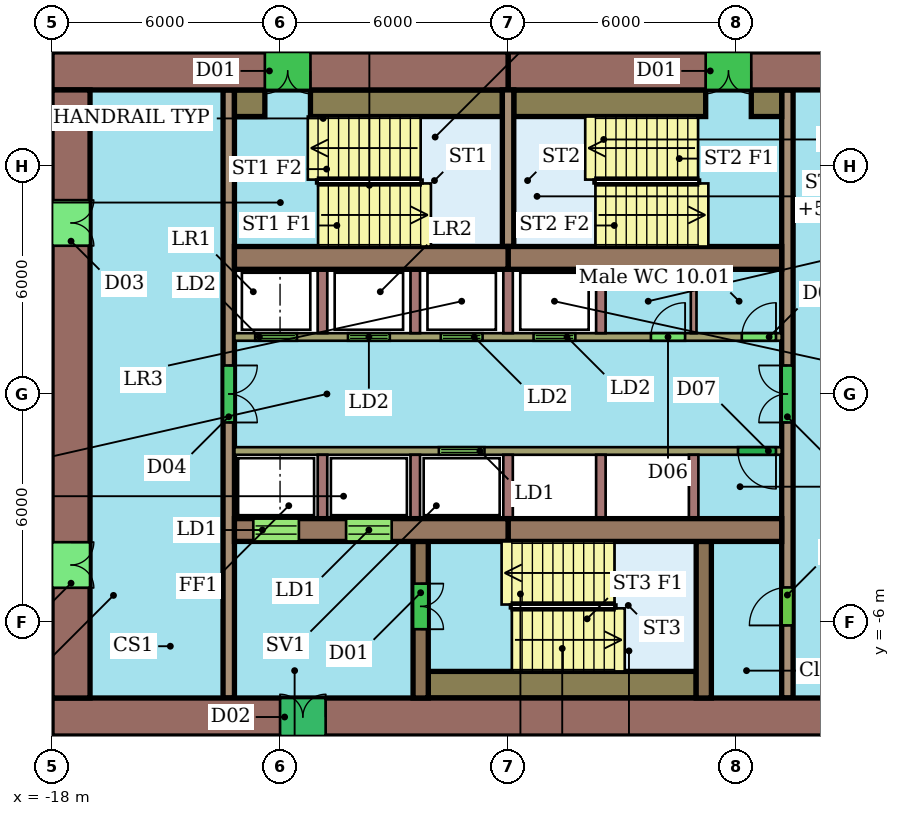
"""IFC4 building model, lengths in metres.
Left out: names, types, materials, properties, quantities, classifications, styles, units other than length and angle.
Written with IfcOpenShell. Run it as: python <this file> out.ifc"""

import sys

from ifc_helpers import new_model, si_unit, direction, frame, frame_2d, origin, place, context, subcontext, project, spatial, rectangle, extrude, element, fill, save


model = new_model("IFC4")
c1 = context("Model", 3, precision=1e-05, world=origin(), true_north=direction((0.0, 1.0)))
c2 = subcontext(c1, "Body", "Model", "MODEL_VIEW")
j1 = project(units=[si_unit("LENGTHUNIT", "METRE"), si_unit("PLANEANGLEUNIT", "RADIAN")], contexts=[c1])
p1 = place(None, origin())
s1 = spatial("IfcSite", under=j1, at=p1, CompositionType="ELEMENT")
p2 = place(p1, origin())
s2 = spatial("IfcBuilding", under=s1, at=p2, CompositionType="ELEMENT")
p3 = place(p2, frame((0.0, 0.0, 54.5)))
s3 = spatial("IfcBuildingStorey", under=s2, at=p3, CompositionType="ELEMENT", Elevation=54.5)
p4 = place(p3, frame((6.0, 8.5, 0.0), z_axis=(0.0, 0.0, 1.0), x_axis=(-1.0, 0.0, 0.0)))
e1 = element("IfcWall", 1, at=p4, inside=s3, PredefinedType="SHEAR", context=c2, shape_type="SweptSolid", body=[
    extrude(rectangle(XDim=12.0, YDim=1.0, at=frame_2d((6.0, 0.0))), origin(), (0.0, 0.0, 1.0), 3.4),
])
p5 = place(p4, frame((5.6, 0.0, 0.0)))
e2 = element("IfcOpeningElement", 2, at=p5, cuts=e1, PredefinedType="OPENING", context=c2, shape_type="SweptSolid", body=[
    extrude(rectangle(XDim=1.2, YDim=2.1, at=frame_2d((0.6, 1.05))), frame((0.0, 0.51, 0.0), z_axis=(0.0, -1.0, 0.0), x_axis=(1.0, 0.0, 0.0)), (0.0, 0.0, 1.0), 1.02),
])
p6 = place(p3, frame((-6.0, 8.5, 0.0), z_axis=(0.0, 0.0, 1.0), x_axis=(-1.0, 0.0, 0.0)))
e3 = element("IfcWall", 3, at=p6, inside=s3, PredefinedType="SHEAR", context=c2, shape_type="SweptSolid", body=[
    extrude(rectangle(XDim=12.0, YDim=1.0, at=frame_2d((6.0, 0.0))), origin(), (0.0, 0.0, 1.0), 3.4),
])
p7 = place(p6, frame((5.2, 0.0, 0.0)))
e4 = element("IfcOpeningElement", 4, at=p7, cuts=e3, PredefinedType="OPENING", context=c2, shape_type="SweptSolid", body=[
    extrude(rectangle(XDim=1.2, YDim=2.1, at=frame_2d((0.6, 1.05))), frame((0.0, 0.51, 0.0), z_axis=(0.0, -1.0, 0.0), x_axis=(1.0, 0.0, 0.0)), (0.0, 0.0, 1.0), 1.02),
])
p8 = place(p3, frame((-18.0, -8.5, 0.0), z_axis=(0.0, 0.0, 1.0), x_axis=(1.0, 0.0, 0.0)))
e5 = element("IfcWall", 5, at=p8, inside=s3, PredefinedType="SHEAR", context=c2, shape_type="SweptSolid", body=[
    extrude(rectangle(XDim=24.0, YDim=1.0, at=frame_2d((12.0, 0.0))), origin(), (0.0, 0.0, 1.0), 3.4),
])
p9 = place(p8, frame((6.0, 0.0, 0.0)))
e6 = element("IfcOpeningElement", 6, at=p9, cuts=e5, PredefinedType="OPENING", context=c2, shape_type="SweptSolid", body=[
    extrude(rectangle(XDim=1.2, YDim=2.1, at=frame_2d((0.6, 1.05))), frame((0.0, 0.51, 0.0), z_axis=(0.0, -1.0, 0.0), x_axis=(1.0, 0.0, 0.0)), (0.0, 0.0, 1.0), 1.02),
])
p10 = place(p3, frame((-17.5, 8.0, 0.0), z_axis=(0.0, 0.0, 1.0), x_axis=(0.0, -1.0, 0.0)))
e7 = element("IfcWall", 7, at=p10, inside=s3, PredefinedType="SHEAR", context=c2, shape_type="SweptSolid", body=[
    extrude(rectangle(XDim=16.0, YDim=1.0, at=frame_2d((8.0, 0.0))), origin(), (0.0, 0.0, 1.0), 3.4),
])
p11 = place(p10, frame((11.9, 0.0, 0.0)))
e8 = element("IfcOpeningElement", 8, at=p11, cuts=e7, PredefinedType="OPENING", context=c2, shape_type="SweptSolid", body=[
    extrude(rectangle(XDim=1.2, YDim=2.1, at=frame_2d((0.6, 1.05))), frame((0.0, 0.51, 0.0), z_axis=(0.0, -1.0, 0.0), x_axis=(1.0, 0.0, 0.0)), (0.0, 0.0, 1.0), 1.02),
])
p12 = place(p10, frame((2.9, 0.0, 0.0)))
e9 = element("IfcOpeningElement", 9, at=p12, cuts=e7, PredefinedType="OPENING", context=c2, shape_type="SweptSolid", body=[
    extrude(rectangle(XDim=1.2, YDim=2.1, at=frame_2d((0.6, 1.05))), frame((0.0, 0.51, 0.0), z_axis=(0.0, -1.0, 0.0), x_axis=(1.0, 0.0, 0.0)), (0.0, 0.0, 1.0), 1.02),
])
for number, where, z_axis, x_axis in (
    (10, (-13.2, 3.58, 0.0), (0.0, 0.0, 1.0), (1.0, 0.0, 0.0)),
    (11, (-6.0, 3.58, 0.0), (0.0, 0.0, 1.0), (1.0, 0.0, 0.0)),
):
    element("IfcWall", number, at=place(p3, frame(where, z_axis=z_axis, x_axis=x_axis)), inside=s3, PredefinedType="SHEAR", context=c2, shape_type="SweptSolid", body=[
        extrude(rectangle(XDim=7.2, YDim=0.6, at=frame_2d((3.6, 0.0))), origin(), (0.0, 0.0, 1.0), 3.4),
    ])
p13 = place(p3, frame((-13.2, -3.58, 0.0), z_axis=(0.0, 0.0, 1.0), x_axis=(1.0, 0.0, 0.0)))
e12 = element("IfcWall", 12, at=p13, inside=s3, PredefinedType="SHEAR", context=c2, shape_type="SweptSolid", body=[
    extrude(rectangle(XDim=7.2, YDim=0.6, at=frame_2d((3.6, 0.0))), origin(), (0.0, 0.0, 1.0), 3.4),
])
p14 = place(p13, frame((0.496, 0.0, 0.0)))
e13 = element("IfcOpeningElement", 13, at=p14, cuts=e12, PredefinedType="OPENING", context=c2, shape_type="SweptSolid", body=[
    extrude(rectangle(XDim=1.2, YDim=2.1, at=frame_2d((0.6, 1.05))), frame((0.0, 0.31, 0.0), z_axis=(0.0, -1.0, 0.0), x_axis=(1.0, 0.0, 0.0)), (0.0, 0.0, 1.0), 0.62),
])
p15 = place(p13, frame((2.938, 0.0, 0.0)))
e14 = element("IfcOpeningElement", 14, at=p15, cuts=e12, PredefinedType="OPENING", context=c2, shape_type="SweptSolid", body=[
    extrude(rectangle(XDim=1.2, YDim=2.1, at=frame_2d((0.6, 1.05))), frame((0.0, 0.31, 0.0), z_axis=(0.0, -1.0, 0.0), x_axis=(1.0, 0.0, 0.0)), (0.0, 0.0, 1.0), 0.62),
])
p16 = place(p3, frame((-6.0, -3.58, 0.0), z_axis=(0.0, 0.0, 1.0), x_axis=(1.0, 0.0, 0.0)))
e15 = element("IfcWall", 15, at=p16, inside=s3, PredefinedType="SHEAR", context=c2, shape_type="SweptSolid", body=[
    extrude(rectangle(XDim=7.2, YDim=0.6, at=frame_2d((3.6, 0.0))), origin(), (0.0, 0.0, 1.0), 3.4),
])
p17 = place(p3, frame((-13.35, 8.0, 0.0), z_axis=(0.0, 0.0, 1.0), x_axis=(0.0, -1.0, 0.0)))
e16 = element("IfcWall", 16, at=p17, inside=s3, PredefinedType="SHEAR", context=c2, shape_type="SweptSolid", body=[
    extrude(rectangle(XDim=16.0, YDim=0.3, at=frame_2d((8.0, 0.0))), origin(), (0.0, 0.0, 1.0), 3.4),
])
p18 = place(p17, frame((7.25, 0.0, 0.0)))
e17 = element("IfcOpeningElement", 17, at=p18, cuts=e16, PredefinedType="OPENING", context=c2, shape_type="SweptSolid", body=[
    extrude(rectangle(XDim=1.5, YDim=2.1, at=frame_2d((0.75, 1.05))), frame((0.0, 0.16, 0.0), z_axis=(0.0, -1.0, 0.0), x_axis=(1.0, 0.0, 0.0)), (0.0, 0.0, 1.0), 0.32),
])
p19 = place(p3, frame((1.35, -8.0, 0.0), z_axis=(0.0, 0.0, 1.0), x_axis=(0.0, 1.0, 0.0)))
e18 = element("IfcWall", 18, at=p19, inside=s3, PredefinedType="SHEAR", context=c2, shape_type="SweptSolid", body=[
    extrude(rectangle(XDim=16.0, YDim=0.3, at=frame_2d((8.0, 0.0))), origin(), (0.0, 0.0, 1.0), 3.4),
])
p20 = place(p19, frame((1.91, 0.0, 0.0)))
e19 = element("IfcOpeningElement", 19, at=p20, cuts=e18, PredefinedType="OPENING", context=c2, shape_type="SweptSolid", body=[
    extrude(rectangle(XDim=1.0, YDim=2.1, at=frame_2d((0.5, 1.05))), frame((0.0, 0.16, 0.0), z_axis=(0.0, -1.0, 0.0), x_axis=(1.0, 0.0, 0.0)), (0.0, 0.0, 1.0), 0.32),
])
p21 = place(p19, frame((7.25, 0.0, 0.0)))
e20 = element("IfcOpeningElement", 20, at=p21, cuts=e18, PredefinedType="OPENING", context=c2, shape_type="SweptSolid", body=[
    extrude(rectangle(XDim=1.5, YDim=2.1, at=frame_2d((0.75, 1.05))), frame((0.0, 0.16, 0.0), z_axis=(0.0, -1.0, 0.0), x_axis=(1.0, 0.0, 0.0)), (0.0, 0.0, 1.0), 0.32),
])
p22 = place(p3, frame((-13.2, 1.5, 0.0), z_axis=(0.0, 0.0, 1.0), x_axis=(1.0, 0.0, 0.0)))
e21 = element("IfcWall", 21, at=p22, inside=s3, PredefinedType="SHEAR", context=c2, shape_type="SweptSolid", body=[
    extrude(rectangle(XDim=14.4, YDim=0.2, at=frame_2d((7.2, 0.0))), origin(), (0.0, 0.0, 1.0), 3.4),
])
p23 = place(p22, frame((0.546, 0.0, 0.0)))
e22 = element("IfcOpeningElement", 22, at=p23, cuts=e21, PredefinedType="OPENING", context=c2, shape_type="SweptSolid", body=[
    extrude(rectangle(XDim=1.1, YDim=2.1, at=frame_2d((0.55, 1.05))), frame((0.0, 0.11, 0.0), z_axis=(0.0, -1.0, 0.0), x_axis=(1.0, 0.0, 0.0)), (0.0, 0.0, 1.0), 0.22),
])
p24 = place(p22, frame((2.988, 0.0, 0.0)))
e23 = element("IfcOpeningElement", 23, at=p24, cuts=e21, PredefinedType="OPENING", context=c2, shape_type="SweptSolid", body=[
    extrude(rectangle(XDim=1.1, YDim=2.1, at=frame_2d((0.55, 1.05))), frame((0.0, 0.11, 0.0), z_axis=(0.0, -1.0, 0.0), x_axis=(1.0, 0.0, 0.0)), (0.0, 0.0, 1.0), 0.22),
])
p25 = place(p22, frame((5.429, 0.0, 0.0)))
e24 = element("IfcOpeningElement", 24, at=p25, cuts=e21, PredefinedType="OPENING", context=c2, shape_type="SweptSolid", body=[
    extrude(rectangle(XDim=1.1, YDim=2.1, at=frame_2d((0.55, 1.05))), frame((0.0, 0.11, 0.0), z_axis=(0.0, -1.0, 0.0), x_axis=(1.0, 0.0, 0.0)), (0.0, 0.0, 1.0), 0.22),
])
p26 = place(p22, frame((7.871, 0.0, 0.0)))
e25 = element("IfcOpeningElement", 25, at=p26, cuts=e21, PredefinedType="OPENING", context=c2, shape_type="SweptSolid", body=[
    extrude(rectangle(XDim=1.1, YDim=2.1, at=frame_2d((0.55, 1.05))), frame((0.0, 0.11, 0.0), z_axis=(0.0, -1.0, 0.0), x_axis=(1.0, 0.0, 0.0)), (0.0, 0.0, 1.0), 0.22),
])
p27 = place(p22, frame((10.958, 0.0, 0.0)))
e26 = element("IfcOpeningElement", 26, at=p27, cuts=e21, PredefinedType="OPENING", context=c2, shape_type="SweptSolid", body=[
    extrude(rectangle(XDim=0.9, YDim=2.1, at=frame_2d((0.45, 1.05))), frame((0.0, 0.11, 0.0), z_axis=(0.0, -1.0, 0.0), x_axis=(1.0, 0.0, 0.0)), (0.0, 0.0, 1.0), 0.22),
])
p28 = place(p22, frame((13.35, 0.0, 0.0)))
e27 = element("IfcOpeningElement", 27, at=p28, cuts=e21, PredefinedType="OPENING", context=c2, shape_type="SweptSolid", body=[
    extrude(rectangle(XDim=0.9, YDim=2.1, at=frame_2d((0.45, 1.05))), frame((0.0, 0.11, 0.0), z_axis=(0.0, -1.0, 0.0), x_axis=(1.0, 0.0, 0.0)), (0.0, 0.0, 1.0), 0.22),
])
p29 = place(p3, frame((1.2, -1.5, 0.0), z_axis=(0.0, 0.0, 1.0), x_axis=(-1.0, 0.0, 0.0)))
e28 = element("IfcWall", 28, at=p29, inside=s3, PredefinedType="SHEAR", context=c2, shape_type="SweptSolid", body=[
    extrude(rectangle(XDim=14.4, YDim=0.2, at=frame_2d((7.2, 0.0))), origin(), (0.0, 0.0, 1.0), 3.4),
])
p30 = place(p29, frame((7.821, 0.0, 0.0)))
e29 = element("IfcOpeningElement", 29, at=p30, cuts=e28, PredefinedType="OPENING", context=c2, shape_type="SweptSolid", body=[
    extrude(rectangle(XDim=1.2, YDim=2.1, at=frame_2d((0.6, 1.05))), frame((0.0, 0.11, 0.0), z_axis=(0.0, -1.0, 0.0), x_axis=(1.0, 0.0, 0.0)), (0.0, 0.0, 1.0), 0.22),
])
p31 = place(p29, frame((0.15, 0.0, 0.0)))
e30 = element("IfcOpeningElement", 30, at=p31, cuts=e28, PredefinedType="OPENING", context=c2, shape_type="SweptSolid", body=[
    extrude(rectangle(XDim=1.0, YDim=2.1, at=frame_2d((0.5, 1.05))), frame((0.0, 0.11, 0.0), z_axis=(0.0, -1.0, 0.0), x_axis=(1.0, 0.0, 0.0)), (0.0, 0.0, 1.0), 0.22),
])
p32 = place(p3, frame((-8.3, -3.88, 0.0), z_axis=(0.0, 0.0, 1.0), x_axis=(0.0, -1.0, 0.0)))
e31 = element("IfcWall", 31, at=p32, inside=s3, PredefinedType="SHEAR", context=c2, shape_type="SweptSolid", body=[
    extrude(rectangle(XDim=4.12, YDim=0.4, at=frame_2d((2.06, 0.0))), origin(), (0.0, 0.0, 1.0), 3.4),
])
p33 = place(p32, frame((1.11, 0.0, 0.0)))
e32 = element("IfcOpeningElement", 32, at=p33, cuts=e31, PredefinedType="OPENING", context=c2, shape_type="SweptSolid", body=[
    extrude(rectangle(XDim=1.2, YDim=2.1, at=frame_2d((0.6, 1.05))), frame((0.0, 0.21, 0.0), z_axis=(0.0, -1.0, 0.0), x_axis=(1.0, 0.0, 0.0)), (0.0, 0.0, 1.0), 0.42),
])
p34 = place(p3, frame((-0.85, -3.88, 0.0), z_axis=(0.0, 0.0, 1.0), x_axis=(0.0, -1.0, 0.0)))
e33 = element("IfcWall", 33, at=p34, inside=s3, PredefinedType="SHEAR", context=c2, shape_type="SweptSolid", body=[
    extrude(rectangle(XDim=4.12, YDim=0.4, at=frame_2d((2.06, 0.0))), origin(), (0.0, 0.0, 1.0), 3.4),
])
p35 = place(p3, frame((-6.0, 3.88, 0.0), z_axis=(0.0, 0.0, 1.0), x_axis=(0.0, 1.0, 0.0)))
e34 = element("IfcWall", 34, at=p35, inside=s3, PredefinedType="SHEAR", context=c2, shape_type="SweptSolid", body=[
    extrude(rectangle(XDim=4.12, YDim=0.3, at=frame_2d((2.06, 0.0))), origin(), (0.0, 0.0, 1.0), 3.4),
])
p36 = place(p3, frame((-13.2, 7.65, 0.0), z_axis=(0.0, 0.0, 1.0), x_axis=(1.0, 0.0, 0.0)))
e35 = element("IfcWall", 35, at=p36, inside=s3, PredefinedType="SHEAR", context=c2, shape_type="SweptSolid", body=[
    extrude(rectangle(XDim=0.8, YDim=0.7, at=frame_2d((0.4, 0.0))), origin(), (0.0, 0.0, 1.0), 3.4),
])
for number, where, z_axis, x_axis in (
    (36, (-11.2, 7.65, 0.0), (0.0, 0.0, 1.0), (1.0, 0.0, 0.0)),
    (37, (-5.85, 7.65, 0.0), (0.0, 0.0, 1.0), (1.0, 0.0, 0.0)),
):
    element("IfcWall", number, at=place(p3, frame(where, z_axis=z_axis, x_axis=x_axis)), inside=s3, PredefinedType="SHEAR", context=c2, shape_type="SweptSolid", body=[
        extrude(rectangle(XDim=5.05, YDim=0.7, at=frame_2d((2.525, 0.0))), origin(), (0.0, 0.0, 1.0), 3.4),
    ])
p37 = place(p3, frame((0.4, 7.65, 0.0), z_axis=(0.0, 0.0, 1.0), x_axis=(1.0, 0.0, 0.0)))
e38 = element("IfcWall", 38, at=p37, inside=s3, PredefinedType="SHEAR", context=c2, shape_type="SweptSolid", body=[
    extrude(rectangle(XDim=0.8, YDim=0.7, at=frame_2d((0.4, 0.0))), origin(), (0.0, 0.0, 1.0), 3.4),
])
p38 = place(p3, frame((-8.1, -7.65, 0.0), z_axis=(0.0, 0.0, 1.0), x_axis=(1.0, 0.0, 0.0)))
e39 = element("IfcWall", 39, at=p38, inside=s3, PredefinedType="SHEAR", context=c2, shape_type="SweptSolid", body=[
    extrude(rectangle(XDim=7.05, YDim=0.7, at=frame_2d((3.525, 0.0))), origin(), (0.0, 0.0, 1.0), 3.4),
])
for number, where, z_axis, x_axis in (
    (40, (-10.883, 1.6, 0.0), (0.0, 0.0, 1.0), (0.0, 1.0, 0.0)),
    (41, (-8.442, 1.6, 0.0), (0.0, 0.0, 1.0), (0.0, 1.0, 0.0)),
    (42, (-6.0, 1.6, 0.0), (0.0, 0.0, 1.0), (0.0, 1.0, 0.0)),
    (43, (-3.558, 1.6, 0.0), (0.0, 0.0, 1.0), (0.0, 1.0, 0.0)),
):
    element("IfcWall", number, at=place(p3, frame(where, z_axis=z_axis, x_axis=x_axis)), inside=s3, PredefinedType="SHEAR", context=c2, shape_type="SweptSolid", body=[
        extrude(rectangle(XDim=1.68, YDim=0.25, at=frame_2d((0.84, 0.0))), origin(), (0.0, 0.0, 1.0), 3.4),
    ])
p39 = place(p3, frame((-1.117, 1.6, 0.0), z_axis=(0.0, 0.0, 1.0), x_axis=(0.0, 1.0, 0.0)))
e44 = element("IfcWall", 44, at=p39, inside=s3, PredefinedType="PARTITIONING", context=c2, shape_type="SweptSolid", body=[
    extrude(rectangle(XDim=1.68, YDim=0.15, at=frame_2d((0.84, 0.0))), origin(), (0.0, 0.0, 1.0), 3.4),
])
for number, where, z_axis, x_axis in (
    (45, (-10.883, -1.6, 0.0), (0.0, 0.0, 1.0), (0.0, -1.0, 0.0)),
    (46, (-8.442, -1.6, 0.0), (0.0, 0.0, 1.0), (0.0, -1.0, 0.0)),
    (47, (-6.0, -1.6, 0.0), (0.0, 0.0, 1.0), (0.0, -1.0, 0.0)),
    (48, (-3.558, -1.6, 0.0), (0.0, 0.0, 1.0), (0.0, -1.0, 0.0)),
    (49, (-1.117, -1.6, 0.0), (0.0, 0.0, 1.0), (0.0, -1.0, 0.0)),
):
    element("IfcWall", number, at=place(p3, frame(where, z_axis=z_axis, x_axis=x_axis)), inside=s3, PredefinedType="SHEAR", context=c2, shape_type="SweptSolid", body=[
        extrude(rectangle(XDim=1.68, YDim=0.25, at=frame_2d((0.84, 0.0))), origin(), (0.0, 0.0, 1.0), 3.4),
    ])
p40 = place(p5, origin())
e50 = element("IfcDoor", 50, at=p40, inside=s3, OperationType="DOUBLE_DOOR_SINGLE_SWING", PredefinedType="NOTDEFINED", context=c2, shape_type="SweptSolid", body=[
    extrude(rectangle(XDim=1.2, YDim=2.1, at=frame_2d((0.6, 1.05))), frame((0.0, 0.025, 0.0), z_axis=(0.0, -1.0, 0.0), x_axis=(1.0, 0.0, 0.0)), (0.0, 0.0, 1.0), 0.05),
])
fill(e2, e50)
p41 = place(p7, origin())
e51 = element("IfcDoor", 51, at=p41, inside=s3, OperationType="DOUBLE_DOOR_SINGLE_SWING", PredefinedType="NOTDEFINED", context=c2, shape_type="SweptSolid", body=[
    extrude(rectangle(XDim=1.2, YDim=2.1, at=frame_2d((0.6, 1.05))), frame((0.0, 0.025, 0.0), z_axis=(0.0, -1.0, 0.0), x_axis=(1.0, 0.0, 0.0)), (0.0, 0.0, 1.0), 0.05),
])
fill(e4, e51)
p42 = place(p9, origin())
e52 = element("IfcDoor", 52, at=p42, inside=s3, OperationType="DOUBLE_DOOR_SINGLE_SWING", PredefinedType="NOTDEFINED", context=c2, shape_type="SweptSolid", body=[
    extrude(rectangle(XDim=1.2, YDim=2.1, at=frame_2d((0.6, 1.05))), frame((0.0, 0.025, 0.0), z_axis=(0.0, -1.0, 0.0), x_axis=(1.0, 0.0, 0.0)), (0.0, 0.0, 1.0), 0.05),
])
fill(e6, e52)
p43 = place(p11, origin())
e53 = element("IfcDoor", 53, at=p43, inside=s3, OperationType="DOUBLE_DOOR_SINGLE_SWING", PredefinedType="NOTDEFINED", context=c2, shape_type="SweptSolid", body=[
    extrude(rectangle(XDim=1.2, YDim=2.1, at=frame_2d((0.6, 1.05))), frame((0.0, 0.025, 0.0), z_axis=(0.0, -1.0, 0.0), x_axis=(1.0, 0.0, 0.0)), (0.0, 0.0, 1.0), 0.05),
])
fill(e8, e53)
p44 = place(p12, origin())
e54 = element("IfcDoor", 54, at=p44, inside=s3, OperationType="DOUBLE_DOOR_SINGLE_SWING", PredefinedType="NOTDEFINED", context=c2, shape_type="SweptSolid", body=[
    extrude(rectangle(XDim=1.2, YDim=2.1, at=frame_2d((0.6, 1.05))), frame((0.0, 0.025, 0.0), z_axis=(0.0, -1.0, 0.0), x_axis=(1.0, 0.0, 0.0)), (0.0, 0.0, 1.0), 0.05),
])
fill(e9, e54)
p45 = place(p14, origin())
e55 = element("IfcDoor", 55, at=p45, inside=s3, OperationType="DOUBLE_DOOR_SLIDING", PredefinedType="NOTDEFINED", context=c2, shape_type="SweptSolid", body=[
    extrude(rectangle(XDim=1.2, YDim=2.1, at=frame_2d((0.6, 1.05))), frame((0.0, 0.025, 0.0), z_axis=(0.0, -1.0, 0.0), x_axis=(1.0, 0.0, 0.0)), (0.0, 0.0, 1.0), 0.05),
])
fill(e13, e55)
p46 = place(p15, origin())
e56 = element("IfcDoor", 56, at=p46, inside=s3, OperationType="DOUBLE_DOOR_SLIDING", PredefinedType="NOTDEFINED", context=c2, shape_type="SweptSolid", body=[
    extrude(rectangle(XDim=1.2, YDim=2.1, at=frame_2d((0.6, 1.05))), frame((0.0, 0.025, 0.0), z_axis=(0.0, -1.0, 0.0), x_axis=(1.0, 0.0, 0.0)), (0.0, 0.0, 1.0), 0.05),
])
fill(e14, e56)
p47 = place(p18, origin())
e57 = element("IfcDoor", 57, at=p47, inside=s3, OperationType="DOUBLE_DOOR_SINGLE_SWING", PredefinedType="NOTDEFINED", context=c2, shape_type="SweptSolid", body=[
    extrude(rectangle(XDim=1.5, YDim=2.1, at=frame_2d((0.75, 1.05))), frame((0.0, 0.025, 0.0), z_axis=(0.0, -1.0, 0.0), x_axis=(1.0, 0.0, 0.0)), (0.0, 0.0, 1.0), 0.05),
])
fill(e17, e57)
p48 = place(p20, origin())
e58 = element("IfcDoor", 58, at=p48, inside=s3, OperationType="SINGLE_SWING_LEFT", PredefinedType="NOTDEFINED", context=c2, shape_type="SweptSolid", body=[
    extrude(rectangle(XDim=1.0, YDim=2.1, at=frame_2d((0.5, 1.05))), frame((0.0, 0.025, 0.0), z_axis=(0.0, -1.0, 0.0), x_axis=(1.0, 0.0, 0.0)), (0.0, 0.0, 1.0), 0.05),
])
fill(e19, e58)
p49 = place(p21, origin())
e59 = element("IfcDoor", 59, at=p49, inside=s3, OperationType="DOUBLE_DOOR_SINGLE_SWING", PredefinedType="NOTDEFINED", context=c2, shape_type="SweptSolid", body=[
    extrude(rectangle(XDim=1.5, YDim=2.1, at=frame_2d((0.75, 1.05))), frame((0.0, 0.025, 0.0), z_axis=(0.0, -1.0, 0.0), x_axis=(1.0, 0.0, 0.0)), (0.0, 0.0, 1.0), 0.05),
])
fill(e20, e59)
p50 = place(p23, origin())
e60 = element("IfcDoor", 60, at=p50, inside=s3, OperationType="DOUBLE_DOOR_SLIDING", PredefinedType="NOTDEFINED", context=c2, shape_type="SweptSolid", body=[
    extrude(rectangle(XDim=1.1, YDim=2.1, at=frame_2d((0.55, 1.05))), frame((0.0, 0.025, 0.0), z_axis=(0.0, -1.0, 0.0), x_axis=(1.0, 0.0, 0.0)), (0.0, 0.0, 1.0), 0.05),
])
fill(e22, e60)
p51 = place(p24, origin())
e61 = element("IfcDoor", 61, at=p51, inside=s3, OperationType="DOUBLE_DOOR_SLIDING", PredefinedType="NOTDEFINED", context=c2, shape_type="SweptSolid", body=[
    extrude(rectangle(XDim=1.1, YDim=2.1, at=frame_2d((0.55, 1.05))), frame((0.0, 0.025, 0.0), z_axis=(0.0, -1.0, 0.0), x_axis=(1.0, 0.0, 0.0)), (0.0, 0.0, 1.0), 0.05),
])
fill(e23, e61)
p52 = place(p25, origin())
e62 = element("IfcDoor", 62, at=p52, inside=s3, OperationType="DOUBLE_DOOR_SLIDING", PredefinedType="NOTDEFINED", context=c2, shape_type="SweptSolid", body=[
    extrude(rectangle(XDim=1.1, YDim=2.1, at=frame_2d((0.55, 1.05))), frame((0.0, 0.025, 0.0), z_axis=(0.0, -1.0, 0.0), x_axis=(1.0, 0.0, 0.0)), (0.0, 0.0, 1.0), 0.05),
])
fill(e24, e62)
p53 = place(p26, origin())
e63 = element("IfcDoor", 63, at=p53, inside=s3, OperationType="DOUBLE_DOOR_SLIDING", PredefinedType="NOTDEFINED", context=c2, shape_type="SweptSolid", body=[
    extrude(rectangle(XDim=1.1, YDim=2.1, at=frame_2d((0.55, 1.05))), frame((0.0, 0.025, 0.0), z_axis=(0.0, -1.0, 0.0), x_axis=(1.0, 0.0, 0.0)), (0.0, 0.0, 1.0), 0.05),
])
fill(e25, e63)
p54 = place(p27, origin())
e64 = element("IfcDoor", 64, at=p54, inside=s3, OperationType="SINGLE_SWING_RIGHT", PredefinedType="NOTDEFINED", context=c2, shape_type="SweptSolid", body=[
    extrude(rectangle(XDim=0.9, YDim=2.1, at=frame_2d((0.45, 1.05))), frame((0.0, 0.025, 0.0), z_axis=(0.0, -1.0, 0.0), x_axis=(1.0, 0.0, 0.0)), (0.0, 0.0, 1.0), 0.05),
])
fill(e26, e64)
p55 = place(p28, origin())
e65 = element("IfcDoor", 65, at=p55, inside=s3, OperationType="SINGLE_SWING_RIGHT", PredefinedType="NOTDEFINED", context=c2, shape_type="SweptSolid", body=[
    extrude(rectangle(XDim=0.9, YDim=2.1, at=frame_2d((0.45, 1.05))), frame((0.0, 0.025, 0.0), z_axis=(0.0, -1.0, 0.0), x_axis=(1.0, 0.0, 0.0)), (0.0, 0.0, 1.0), 0.05),
])
fill(e27, e65)
p56 = place(p30, origin())
e66 = element("IfcDoor", 66, at=p56, inside=s3, OperationType="DOUBLE_DOOR_SLIDING", PredefinedType="NOTDEFINED", context=c2, shape_type="SweptSolid", body=[
    extrude(rectangle(XDim=1.2, YDim=2.1, at=frame_2d((0.6, 1.05))), frame((0.0, 0.025, 0.0), z_axis=(0.0, -1.0, 0.0), x_axis=(1.0, 0.0, 0.0)), (0.0, 0.0, 1.0), 0.05),
])
fill(e29, e66)
p57 = place(p31, origin())
e67 = element("IfcDoor", 67, at=p57, inside=s3, OperationType="SINGLE_SWING_LEFT", PredefinedType="NOTDEFINED", context=c2, shape_type="SweptSolid", body=[
    extrude(rectangle(XDim=1.0, YDim=2.1, at=frame_2d((0.5, 1.05))), frame((0.0, 0.025, 0.0), z_axis=(0.0, -1.0, 0.0), x_axis=(1.0, 0.0, 0.0)), (0.0, 0.0, 1.0), 0.05),
])
fill(e30, e67)
p58 = place(p33, origin())
e68 = element("IfcDoor", 68, at=p58, inside=s3, OperationType="DOUBLE_DOOR_SINGLE_SWING", PredefinedType="NOTDEFINED", context=c2, shape_type="SweptSolid", body=[
    extrude(rectangle(XDim=1.2, YDim=2.1, at=frame_2d((0.6, 1.05))), frame((0.0, 0.025, 0.0), z_axis=(0.0, -1.0, 0.0), x_axis=(1.0, 0.0, 0.0)), (0.0, 0.0, 1.0), 0.05),
])
fill(e32, e68)
save(model, sys.argv[1])
